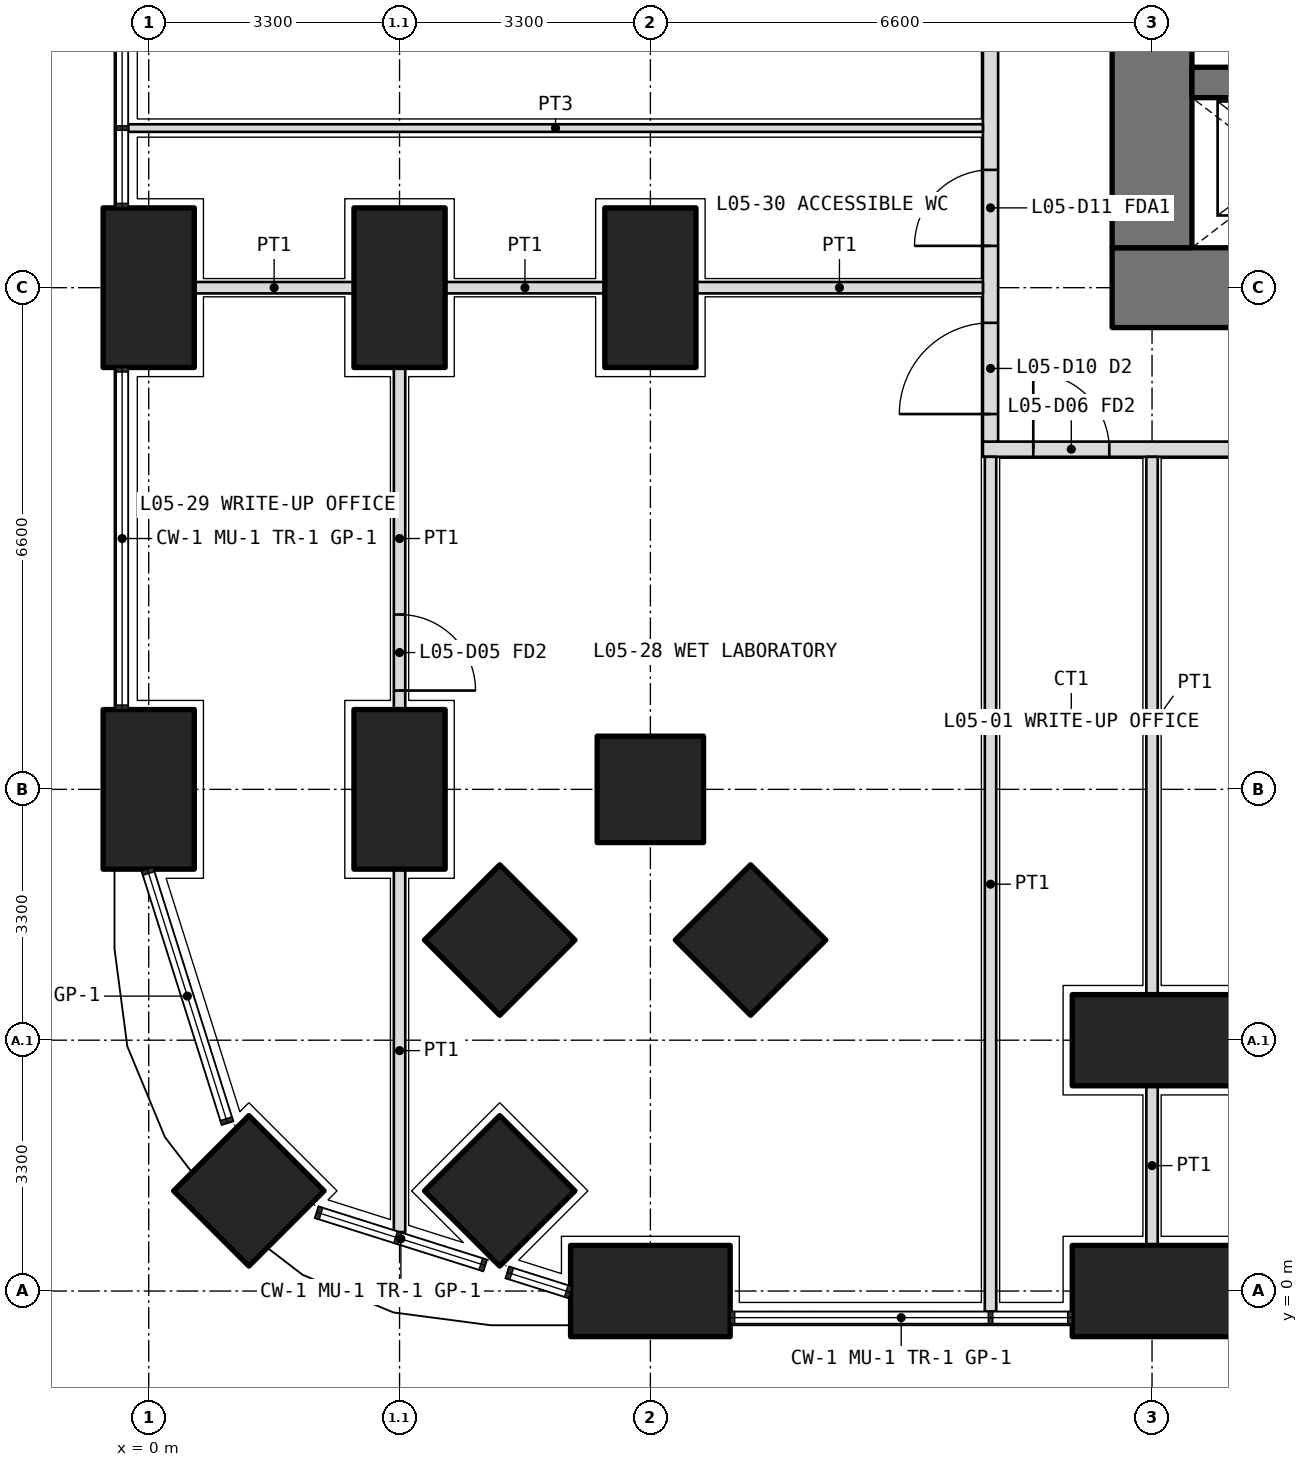
"""IFC4 building model, lengths in metres.
Left out: names, types, materials, properties, quantities, classifications, styles, units other than length and angle.
Written with IfcOpenShell. Run it as: python <this file> out.ifc"""

import sys

from ifc_helpers import new_model, si_unit, direction, frame, frame_2d, origin, origin_2d, place, context, subcontext, project, spatial, rectangle, extrude, element, fill, save


model = new_model("IFC4")
c1 = context("Model", 3, precision=1e-05, world=origin(), true_north=direction((0.0, 1.0)))
c2 = subcontext(c1, "Body", "Model", "MODEL_VIEW")
j1 = project(units=[si_unit("LENGTHUNIT", "METRE"), si_unit("PLANEANGLEUNIT", "RADIAN")], contexts=[c1])
p1 = place(None, origin())
s1 = spatial("IfcSite", under=j1, at=p1, CompositionType="ELEMENT")
p2 = place(p1, origin())
s2 = spatial("IfcBuilding", under=s1, at=p2, CompositionType="ELEMENT")
p3 = place(p2, frame((0.0, 0.0, 25.5)))
s3 = spatial("IfcBuildingStorey", under=s2, at=p3, CompositionType="ELEMENT", Elevation=25.5)
p4 = place(p3, frame((1.318, 1.318, 0.0), z_axis=(0.0, 0.0, 1.0), x_axis=(0.707106781187, 0.707106781187, 0.0)))
e1 = element("IfcColumn", 1, at=p4, inside=s3, PredefinedType="COLUMN", context=c2, shape_type="SweptSolid", body=[
    extrude(rectangle(XDim=1.4, YDim=1.4, at=origin_2d()), origin(), (0.0, 0.0, 1.0), 4.2),
])
for number, where, z_axis, x_axis in (
    (2, (6.6, 0.0, 0.0), (0.0, 0.0, 1.0), (1.0, 0.0, 0.0)),
    (3, (13.2, 0.0, 0.0), (0.0, 0.0, 1.0), (1.0, 0.0, 0.0)),
    (4, (0.0, 6.6, 0.0), (0.0, 0.0, 1.0), (0.0, 1.0, 0.0)),
    (5, (0.0, 13.2, 0.0), (0.0, 0.0, 1.0), (0.0, 1.0, 0.0)),
):
    element("IfcColumn", number, at=place(p3, frame(where, z_axis=z_axis, x_axis=x_axis)), inside=s3, PredefinedType="COLUMN", context=c2, shape_type="SweptSolid", body=[
        extrude(rectangle(XDim=2.1, YDim=1.2, at=origin_2d()), origin(), (0.0, 0.0, 1.0), 4.2),
    ])
for number, where, z_axis, x_axis in (
    (6, (6.6, 6.6, 0.0), (0.0, 0.0, 1.0), (1.0, 0.0, 0.0)),
    (7, (4.618, 1.318, 0.0), (0.0, 0.0, 1.0), (0.707, 0.707, 0.0)),
):
    element("IfcColumn", number, at=place(p3, frame(where, z_axis=z_axis, x_axis=x_axis)), inside=s3, PredefinedType="COLUMN", context=c2, shape_type="SweptSolid", body=[
        extrude(rectangle(XDim=1.4, YDim=1.4, at=origin_2d()), origin(), (0.0, 0.0, 1.0), 4.2),
    ])
for number, where, z_axis, x_axis in (
    (8, (3.3, 6.6, 0.0), (0.0, 0.0, 1.0), (0.0, 1.0, 0.0)),
    (9, (3.3, 13.2, 0.0), (0.0, 0.0, 1.0), (0.0, 1.0, 0.0)),
):
    element("IfcColumn", number, at=place(p3, frame(where, z_axis=z_axis, x_axis=x_axis)), inside=s3, PredefinedType="COLUMN", context=c2, shape_type="SweptSolid", body=[
        extrude(rectangle(XDim=2.1, YDim=1.2, at=origin_2d()), origin(), (0.0, 0.0, 1.0), 4.2),
    ])
p5 = place(p3, frame((4.618, 4.618, 0.0), z_axis=(0.0, 0.0, 1.0), x_axis=(0.707106781187, 0.707106781187, 0.0)))
e10 = element("IfcColumn", 10, at=p5, inside=s3, PredefinedType="COLUMN", context=c2, shape_type="SweptSolid", body=[
    extrude(rectangle(XDim=1.4, YDim=1.4, at=origin_2d()), origin(), (0.0, 0.0, 1.0), 4.2),
])
p6 = place(p3, frame((13.2, 3.3, 0.0), z_axis=(0.0, 0.0, 1.0), x_axis=(1.0, 0.0, 0.0)))
e11 = element("IfcColumn", 11, at=p6, inside=s3, PredefinedType="COLUMN", context=c2, shape_type="SweptSolid", body=[
    extrude(rectangle(XDim=2.1, YDim=1.2, at=origin_2d()), origin(), (0.0, 0.0, 1.0), 4.2),
])
p7 = place(p3, frame((7.918, 4.618, 0.0), z_axis=(0.0, 0.0, 1.0), x_axis=(0.707106781187, 0.707106781187, 0.0)))
e12 = element("IfcColumn", 12, at=p7, inside=s3, PredefinedType="COLUMN", context=c2, shape_type="SweptSolid", body=[
    extrude(rectangle(XDim=1.4, YDim=1.4, at=origin_2d()), origin(), (0.0, 0.0, 1.0), 4.2),
])
p8 = place(p3, frame((6.6, 13.2, 0.0), z_axis=(0.0, 0.0, 1.0), x_axis=(0.0, 1.0, 0.0)))
e13 = element("IfcColumn", 13, at=p8, inside=s3, PredefinedType="COLUMN", context=c2, shape_type="SweptSolid", body=[
    extrude(rectangle(XDim=2.1, YDim=1.2, at=origin_2d()), origin(), (0.0, 0.0, 1.0), 4.2),
])
p9 = place(p3, frame((12.675, 13.2, 0.0), z_axis=(0.0, 0.0, 1.0), x_axis=(1.0, 0.0, 0.0)))
e14 = element("IfcWall", 14, at=p9, inside=s3, PredefinedType="SHEAR", context=c2, shape_type="SweptSolid", body=[
    extrude(rectangle(XDim=27.45, YDim=1.05, at=frame_2d((13.725, 0.0))), origin(), (0.0, 0.0, 1.0), 4.2),
])
p10 = place(p3, frame((13.2, 32.475, 0.0), z_axis=(0.0, 0.0, 1.0), x_axis=(0.0, -1.0, 0.0)))
e15 = element("IfcWall", 15, at=p10, inside=s3, PredefinedType="SHEAR", context=c2, shape_type="SweptSolid", body=[
    extrude(rectangle(XDim=18.75, YDim=1.05, at=frame_2d((9.375, 0.0))), origin(), (0.0, 0.0, 1.0), 4.2),
])
p11 = place(p10, frame((14.125, 0.0, 0.0)))
e16 = element("IfcOpeningElement", 16, at=p11, cuts=e15, PredefinedType="OPENING", context=c2, shape_type="SweptSolid", body=[
    extrude(rectangle(XDim=1.6, YDim=2.1, at=frame_2d((0.8, 1.05))), frame((0.0, 0.535, 0.0), z_axis=(0.0, -1.0, 0.0), x_axis=(1.0, 0.0, 0.0)), (0.0, 0.0, 1.0), 1.07),
])
p12 = place(p10, frame((3.325, 0.0, 0.0)))
e17 = element("IfcOpeningElement", 17, at=p12, cuts=e15, PredefinedType="OPENING", context=c2, shape_type="SweptSolid", body=[
    extrude(rectangle(XDim=1.6, YDim=2.1, at=frame_2d((0.8, 1.05))), frame((0.0, 0.535, 0.0), z_axis=(0.0, -1.0, 0.0), x_axis=(1.0, 0.0, 0.0)), (0.0, 0.0, 1.0), 1.07),
])
p13 = place(p3, frame((13.725, 15.9, 0.0), z_axis=(0.0, 0.0, 1.0), x_axis=(1.0, 0.0, 0.0)))
e18 = element("IfcWall", 18, at=p13, inside=s3, PredefinedType="SHEAR", context=c2, shape_type="SweptSolid", body=[
    extrude(rectangle(XDim=25.35, YDim=0.4, at=frame_2d((12.675, 0.0))), origin(), (0.0, 0.0, 1.0), 4.2),
])
p14 = place(p13, frame((0.788, 0.0, 0.0)))
e19 = element("IfcOpeningElement", 19, at=p14, cuts=e18, PredefinedType="OPENING", context=c2, shape_type="SweptSolid", body=[
    extrude(rectangle(XDim=1.1, YDim=2.1, at=frame_2d((0.55, 1.05))), frame((0.0, 0.21, 0.0), z_axis=(0.0, -1.0, 0.0), x_axis=(1.0, 0.0, 0.0)), (0.0, 0.0, 1.0), 0.42),
])
p15 = place(p13, frame((3.875, 0.0, 0.0)))
e20 = element("IfcOpeningElement", 20, at=p15, cuts=e18, PredefinedType="OPENING", context=c2, shape_type="SweptSolid", body=[
    extrude(rectangle(XDim=1.1, YDim=2.1, at=frame_2d((0.55, 1.05))), frame((0.0, 0.21, 0.0), z_axis=(0.0, -1.0, 0.0), x_axis=(1.0, 0.0, 0.0)), (0.0, 0.0, 1.0), 0.42),
])
p16 = place(p13, frame((7.175, 0.0, 0.0)))
e21 = element("IfcOpeningElement", 21, at=p16, cuts=e18, PredefinedType="OPENING", context=c2, shape_type="SweptSolid", body=[
    extrude(rectangle(XDim=1.1, YDim=2.1, at=frame_2d((0.55, 1.05))), frame((0.0, 0.21, 0.0), z_axis=(0.0, -1.0, 0.0), x_axis=(1.0, 0.0, 0.0)), (0.0, 0.0, 1.0), 0.42),
])
p17 = place(p13, frame((10.475, 0.0, 0.0)))
e22 = element("IfcOpeningElement", 22, at=p17, cuts=e18, PredefinedType="OPENING", context=c2, shape_type="SweptSolid", body=[
    extrude(rectangle(XDim=1.1, YDim=2.1, at=frame_2d((0.55, 1.05))), frame((0.0, 0.21, 0.0), z_axis=(0.0, -1.0, 0.0), x_axis=(1.0, 0.0, 0.0)), (0.0, 0.0, 1.0), 0.42),
])
p18 = place(p3, frame((10.975, 11.075, 0.0), z_axis=(0.0, 0.0, 1.0), x_axis=(1.0, 0.0, 0.0)))
e23 = element("IfcWall", 23, at=p18, inside=s3, PredefinedType="PARTITIONING", context=c2, shape_type="SweptSolid", body=[
    extrude(rectangle(XDim=30.85, YDim=0.2, at=frame_2d((15.425, 0.0))), origin(), (0.0, 0.0, 1.0), 2.85),
])
p19 = place(p18, frame((0.663, 0.0, 0.0)))
e24 = element("IfcOpeningElement", 24, at=p19, cuts=e23, PredefinedType="OPENING", context=c2, shape_type="SweptSolid", body=[
    extrude(rectangle(XDim=1.0, YDim=2.1, at=frame_2d((0.5, 1.05))), frame((0.0, 0.11, 0.0), z_axis=(0.0, -1.0, 0.0), x_axis=(1.0, 0.0, 0.0)), (0.0, 0.0, 1.0), 0.22),
])
p20 = place(p18, frame((8.325, 0.0, 0.0)))
e25 = element("IfcOpeningElement", 25, at=p20, cuts=e23, PredefinedType="OPENING", context=c2, shape_type="SweptSolid", body=[
    extrude(rectangle(XDim=1.0, YDim=2.1, at=frame_2d((0.5, 1.05))), frame((0.0, 0.11, 0.0), z_axis=(0.0, -1.0, 0.0), x_axis=(1.0, 0.0, 0.0)), (0.0, 0.0, 1.0), 0.22),
])
p21 = place(p18, frame((19.875, 0.0, 0.0)))
e26 = element("IfcOpeningElement", 26, at=p21, cuts=e23, PredefinedType="OPENING", context=c2, shape_type="SweptSolid", body=[
    extrude(rectangle(XDim=1.0, YDim=2.1, at=frame_2d((0.5, 1.05))), frame((0.0, 0.11, 0.0), z_axis=(0.0, -1.0, 0.0), x_axis=(1.0, 0.0, 0.0)), (0.0, 0.0, 1.0), 0.22),
])
p22 = place(p18, frame((27.538, 0.0, 0.0)))
e27 = element("IfcOpeningElement", 27, at=p22, cuts=e23, PredefinedType="OPENING", context=c2, shape_type="SweptSolid", body=[
    extrude(rectangle(XDim=1.0, YDim=2.1, at=frame_2d((0.5, 1.05))), frame((0.0, 0.11, 0.0), z_axis=(0.0, -1.0, 0.0), x_axis=(1.0, 0.0, 0.0)), (0.0, 0.0, 1.0), 0.22),
])
p23 = place(p3, frame((11.075, 11.175, 0.0), z_axis=(0.0, 0.0, 1.0), x_axis=(0.0, 1.0, 0.0)))
e28 = element("IfcWall", 28, at=p23, inside=s3, PredefinedType="PARTITIONING", context=c2, shape_type="SweptSolid", body=[
    extrude(rectangle(XDim=23.85, YDim=0.2, at=frame_2d((11.925, 0.0))), origin(), (0.0, 0.0, 1.0), 2.85),
])
p24 = place(p23, frame((0.363, 0.0, 0.0)))
e29 = element("IfcOpeningElement", 29, at=p24, cuts=e28, PredefinedType="OPENING", context=c2, shape_type="SweptSolid", body=[
    extrude(rectangle(XDim=1.2, YDim=2.1, at=frame_2d((0.6, 1.05))), frame((0.0, 0.11, 0.0), z_axis=(0.0, -1.0, 0.0), x_axis=(1.0, 0.0, 0.0)), (0.0, 0.0, 1.0), 0.22),
])
p25 = place(p23, frame((2.575, 0.0, 0.0)))
e30 = element("IfcOpeningElement", 30, at=p25, cuts=e28, PredefinedType="OPENING", context=c2, shape_type="SweptSolid", body=[
    extrude(rectangle(XDim=1.0, YDim=2.1, at=frame_2d((0.5, 1.05))), frame((0.0, 0.11, 0.0), z_axis=(0.0, -1.0, 0.0), x_axis=(1.0, 0.0, 0.0)), (0.0, 0.0, 1.0), 0.22),
])
p26 = place(p23, frame((5.65, 0.0, 0.0)))
e31 = element("IfcOpeningElement", 31, at=p26, cuts=e28, PredefinedType="OPENING", context=c2, shape_type="SweptSolid", body=[
    extrude(rectangle(XDim=0.9, YDim=2.1, at=frame_2d((0.45, 1.05))), frame((0.0, 0.11, 0.0), z_axis=(0.0, -1.0, 0.0), x_axis=(1.0, 0.0, 0.0)), (0.0, 0.0, 1.0), 0.22),
])
p27 = place(p23, frame((9.5, 0.0, 0.0)))
e32 = element("IfcOpeningElement", 32, at=p27, cuts=e28, PredefinedType="OPENING", context=c2, shape_type="SweptSolid", body=[
    extrude(rectangle(XDim=0.9, YDim=2.1, at=frame_2d((0.45, 1.05))), frame((0.0, 0.11, 0.0), z_axis=(0.0, -1.0, 0.0), x_axis=(1.0, 0.0, 0.0)), (0.0, 0.0, 1.0), 0.22),
])
p28 = place(p23, frame((13.025, 0.0, 0.0)))
e33 = element("IfcOpeningElement", 33, at=p28, cuts=e28, PredefinedType="OPENING", context=c2, shape_type="SweptSolid", body=[
    extrude(rectangle(XDim=1.0, YDim=2.1, at=frame_2d((0.5, 1.05))), frame((0.0, 0.11, 0.0), z_axis=(0.0, -1.0, 0.0), x_axis=(1.0, 0.0, 0.0)), (0.0, 0.0, 1.0), 0.22),
])
p29 = place(p23, frame((17.925, 0.0, 0.0)))
e34 = element("IfcOpeningElement", 34, at=p29, cuts=e28, PredefinedType="OPENING", context=c2, shape_type="SweptSolid", body=[
    extrude(rectangle(XDim=1.2, YDim=2.1, at=frame_2d((0.6, 1.05))), frame((0.0, 0.11, 0.0), z_axis=(0.0, -1.0, 0.0), x_axis=(1.0, 0.0, 0.0)), (0.0, 0.0, 1.0), 0.22),
])
p30 = place(p23, frame((22.387, 0.0, 0.0)))
e35 = element("IfcOpeningElement", 35, at=p30, cuts=e28, PredefinedType="OPENING", context=c2, shape_type="SweptSolid", body=[
    extrude(rectangle(XDim=1.0, YDim=2.1, at=frame_2d((0.5, 1.05))), frame((0.0, 0.11, 0.0), z_axis=(0.0, -1.0, 0.0), x_axis=(1.0, 0.0, 0.0)), (0.0, 0.0, 1.0), 0.22),
])
p31 = place(p3, frame((11.075, -0.27, 0.0), z_axis=(0.0, 0.0, 1.0), x_axis=(0.0, 1.0, 0.0)))
e36 = element("IfcWall", 36, at=p31, inside=s3, PredefinedType="PARTITIONING", context=c2, shape_type="SweptSolid", body=[
    extrude(rectangle(XDim=11.245, YDim=0.15, at=frame_2d((5.623, 0.0))), origin(), (0.0, 0.0, 1.0), 2.7),
])
p32 = place(p3, frame((13.2, 0.6, 0.0), z_axis=(0.0, 0.0, 1.0), x_axis=(0.0, 1.0, 0.0)))
e37 = element("IfcWall", 37, at=p32, inside=s3, PredefinedType="PARTITIONING", context=c2, shape_type="SweptSolid", body=[
    extrude(rectangle(XDim=2.1, YDim=0.15, at=frame_2d((1.05, 0.0))), origin(), (0.0, 0.0, 1.0), 2.85),
])
p33 = place(p3, frame((13.2, 3.9, 0.0), z_axis=(0.0, 0.0, 1.0), x_axis=(0.0, 1.0, 0.0)))
e38 = element("IfcWall", 38, at=p33, inside=s3, PredefinedType="PARTITIONING", context=c2, shape_type="SweptSolid", body=[
    extrude(rectangle(XDim=7.075, YDim=0.15, at=frame_2d((3.538, 0.0))), origin(), (0.0, 0.0, 1.0), 2.85),
])
p34 = place(p3, frame((3.3, 12.15, 0.0), z_axis=(0.0, 0.0, 1.0), x_axis=(0.0, -1.0, 0.0)))
e39 = element("IfcWall", 39, at=p34, inside=s3, PredefinedType="PARTITIONING", context=c2, shape_type="SweptSolid", body=[
    extrude(rectangle(XDim=4.5, YDim=0.15, at=frame_2d((2.25, 0.0))), origin(), (0.0, 0.0, 1.0), 3.9),
])
p35 = place(p34, frame((3.25, 0.0, 0.0)))
e40 = element("IfcOpeningElement", 40, at=p35, cuts=e39, PredefinedType="OPENING", context=c2, shape_type="SweptSolid", body=[
    extrude(rectangle(XDim=1.0, YDim=2.1, at=frame_2d((0.5, 1.05))), frame((0.0, 0.085, 0.0), z_axis=(0.0, -1.0, 0.0), x_axis=(1.0, 0.0, 0.0)), (0.0, 0.0, 1.0), 0.17),
])
p36 = place(p3, frame((3.3, 5.55, 0.0), z_axis=(0.0, 0.0, 1.0), x_axis=(0.0, -1.0, 0.0)))
e41 = element("IfcWall", 41, at=p36, inside=s3, PredefinedType="PARTITIONING", context=c2, shape_type="SweptSolid", body=[
    extrude(rectangle(XDim=4.774, YDim=0.15, at=frame_2d((2.387, 0.0))), origin(), (0.0, 0.0, 1.0), 2.7),
])
p37 = place(p3, frame((-0.27, 15.3, 0.0), z_axis=(0.0, 0.0, 1.0), x_axis=(1.0, 0.0, 0.0)))
e42 = element("IfcWall", 42, at=p37, inside=s3, PredefinedType="PARTITIONING", context=c2, shape_type="SweptSolid", body=[
    extrude(rectangle(XDim=11.245, YDim=0.1, at=frame_2d((5.623, 0.0))), origin(), (0.0, 0.0, 1.0), 2.7),
])
p38 = place(p3, frame((0.6, 13.2, 0.0), z_axis=(0.0, 0.0, 1.0), x_axis=(1.0, 0.0, 0.0)))
e43 = element("IfcWall", 43, at=p38, inside=s3, PredefinedType="PARTITIONING", context=c2, shape_type="SweptSolid", body=[
    extrude(rectangle(XDim=2.1, YDim=0.15, at=frame_2d((1.05, 0.0))), origin(), (0.0, 0.0, 1.0), 2.85),
])
p39 = place(p3, frame((3.9, 13.2, 0.0), z_axis=(0.0, 0.0, 1.0), x_axis=(1.0, 0.0, 0.0)))
e44 = element("IfcWall", 44, at=p39, inside=s3, PredefinedType="PARTITIONING", context=c2, shape_type="SweptSolid", body=[
    extrude(rectangle(XDim=2.1, YDim=0.15, at=frame_2d((1.05, 0.0))), origin(), (0.0, 0.0, 1.0), 2.85),
])
p40 = place(p3, frame((7.2, 13.2, 0.0), z_axis=(0.0, 0.0, 1.0), x_axis=(1.0, 0.0, 0.0)))
e45 = element("IfcWall", 45, at=p40, inside=s3, PredefinedType="PARTITIONING", context=c2, shape_type="SweptSolid", body=[
    extrude(rectangle(XDim=3.775, YDim=0.15, at=frame_2d((1.888, 0.0))), origin(), (0.0, 0.0, 1.0), 2.85),
])
p41 = place(p19, origin())
e46 = element("IfcDoor", 46, at=p41, inside=s3, OperationType="SINGLE_SWING_LEFT", PredefinedType="DOOR", context=c2, shape_type="SweptSolid", body=[
    extrude(rectangle(XDim=1.0, YDim=2.1, at=frame_2d((0.5, 1.05))), frame((0.0, 0.025, 0.0), z_axis=(0.0, -1.0, 0.0), x_axis=(1.0, 0.0, 0.0)), (0.0, 0.0, 1.0), 0.05),
])
fill(e24, e46)
p42 = place(p24, origin())
e47 = element("IfcDoor", 47, at=p42, inside=s3, OperationType="DOUBLE_DOOR_SINGLE_SWING", PredefinedType="DOOR", context=c2, shape_type="SweptSolid", body=[
    extrude(rectangle(XDim=1.2, YDim=2.1, at=frame_2d((0.6, 1.05))), frame((0.0, 0.025, 0.0), z_axis=(0.0, -1.0, 0.0), x_axis=(1.0, 0.0, 0.0)), (0.0, 0.0, 1.0), 0.05),
])
fill(e29, e47)
p43 = place(p35, origin())
e48 = element("IfcDoor", 48, at=p43, inside=s3, OperationType="SINGLE_SWING_RIGHT", PredefinedType="DOOR", context=c2, shape_type="SweptSolid", body=[
    extrude(rectangle(XDim=1.0, YDim=2.1, at=frame_2d((0.5, 1.05))), frame((0.0, 0.025, 0.0), z_axis=(0.0, -1.0, 0.0), x_axis=(1.0, 0.0, 0.0)), (0.0, 0.0, 1.0), 0.05),
])
fill(e40, e48)
p44 = place(p25, origin())
e49 = element("IfcDoor", 49, at=p44, inside=s3, OperationType="SINGLE_SWING_LEFT", PredefinedType="DOOR", context=c2, shape_type="SweptSolid", body=[
    extrude(rectangle(XDim=1.0, YDim=2.1, at=frame_2d((0.5, 1.05))), frame((0.0, 0.025, 0.0), z_axis=(0.0, -1.0, 0.0), x_axis=(1.0, 0.0, 0.0)), (0.0, 0.0, 1.0), 0.05),
])
fill(e30, e49)
save(model, sys.argv[1])
